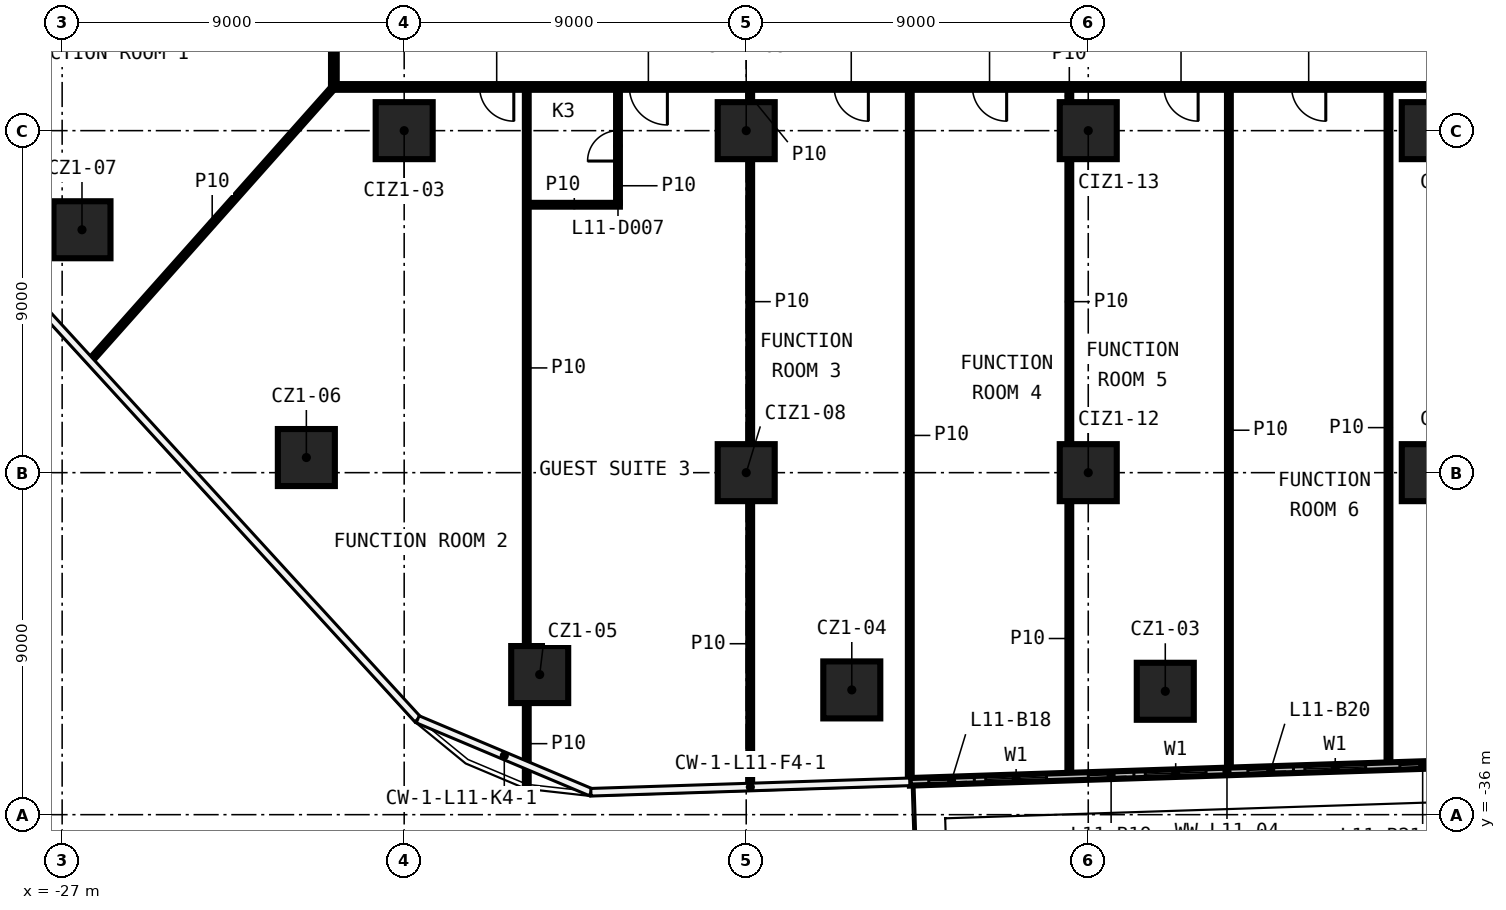
"""IFC4 building model, lengths in metres.
Left out: names, types, materials, properties, quantities, classifications, styles, units other than length and angle.
Written with IfcOpenShell. Run it as: python <this file> out.ifc"""

import sys

from ifc_helpers import new_model, si_unit, direction, frame, frame_2d, origin, origin_2d, place, context, subcontext, project, spatial, rectangle, extrude, element, fill, save


model = new_model("IFC4")
c1 = context("Model", 3, precision=1e-05, world=origin(), true_north=direction((0.0, 1.0)))
c2 = subcontext(c1, "Body", "Model", "MODEL_VIEW")
j1 = project(units=[si_unit("LENGTHUNIT", "METRE"), si_unit("PLANEANGLEUNIT", "RADIAN")], contexts=[c1])
p1 = place(None, origin())
s1 = spatial("IfcSite", under=j1, at=p1, CompositionType="ELEMENT")
p2 = place(p1, origin())
s2 = spatial("IfcBuilding", under=s1, at=p2, CompositionType="ELEMENT")
p3 = place(p2, frame((0.0, 0.0, 62.5)))
s3 = spatial("IfcBuildingStorey", under=s2, at=p3, CompositionType="ELEMENT", Elevation=62.5)
for number, where, z_axis, x_axis in (
    (1, (2.027, -32.753, 0.0), (0.0, 0.0, 1.0), (1.0, 0.0, 0.0)),
    (2, (-6.222, -32.717, 0.0), (0.0, 0.0, 1.0), (1.0, 0.0, 0.0)),
    (3, (-14.434, -32.313, 0.0), (0.0, 0.0, 1.0), (1.0, 0.0, 0.0)),
    (4, (-20.574, -26.602, 0.0), (0.0, 0.0, 1.0), (1.0, 0.0, 0.0)),
    (5, (-26.478, -20.608, 0.0), (0.0, 0.0, 1.0), (1.0, 0.0, 0.0)),
    (6, (-18.0, -18.0, 0.0), (0.0, 0.0, 1.0), (1.0, 0.0, 0.0)),
    (7, (-9.0, -27.0, 0.0), (0.0, 0.0, 1.0), (1.0, 0.0, 0.0)),
    (8, (-9.0, -18.0, 0.0), (0.0, 0.0, 1.0), (1.0, 0.0, 0.0)),
    (9, (0.0, -27.0, 0.0), (0.0, 0.0, 1.0), (1.0, 0.0, 0.0)),
    (10, (0.0, -18.0, 0.0), (0.0, 0.0, 1.0), (1.0, 0.0, 0.0)),
    (11, (9.0, -27.0, 0.0), (0.0, 0.0, 1.0), (1.0, 0.0, 0.0)),
    (12, (9.0, -18.0, 0.0), (0.0, 0.0, 1.0), (1.0, 0.0, 0.0)),
):
    element("IfcColumn", number, at=place(p3, frame(where, z_axis=z_axis, x_axis=x_axis)), inside=s3, PredefinedType="COLUMN", context=c2, shape_type="SweptSolid", body=[
        extrude(rectangle(XDim=1.5, YDim=1.5, at=origin_2d()), origin(), (0.0, 0.0, 1.0), 3.3),
    ])
p4 = place(p3, frame((-14.724, -19.95, 0.0), z_axis=(0.0, 0.0, 1.0), x_axis=(1.0, 0.0, 0.0)))
e13 = element("IfcWall", 13, at=p4, inside=s3, PredefinedType="PARTITIONING", context=c2, shape_type="SweptSolid", body=[
    extrude(rectangle(XDim=2.4, YDim=0.1, at=frame_2d((1.2, 0.0))), origin(), (0.0, 0.0, 1.0), 3.3),
])
p5 = place(p3, frame((19.925, -16.85, 0.0), z_axis=(0.0, 0.0, 1.0), x_axis=(-1.0, 0.0, 0.0)))
e14 = element("IfcWall", 14, at=p5, inside=s3, PredefinedType="PARTITIONING", context=c2, shape_type="SweptSolid", body=[
    extrude(rectangle(XDim=39.85, YDim=0.15, at=frame_2d((19.925, 0.0))), origin(), (0.0, 0.0, 1.0), 3.3),
])
p6 = place(p5, frame((35.041, 0.0, 0.0)))
e15 = element("IfcOpeningElement", 15, at=p6, cuts=e14, PredefinedType="OPENING", context=c2, shape_type="SweptSolid", body=[
    extrude(rectangle(XDim=0.9, YDim=2.1, at=frame_2d((0.45, 1.05))), frame((0.0, 0.085, 0.0), z_axis=(0.0, -1.0, 0.0), x_axis=(1.0, 0.0, 0.0)), (0.0, 0.0, 1.0), 0.17),
])
p7 = place(p5, frame((31.0, 0.0, 0.0)))
e16 = element("IfcOpeningElement", 16, at=p7, cuts=e14, PredefinedType="OPENING", context=c2, shape_type="SweptSolid", body=[
    extrude(rectangle(XDim=1.0, YDim=2.1, at=frame_2d((0.5, 1.05))), frame((0.0, 0.085, 0.0), z_axis=(0.0, -1.0, 0.0), x_axis=(1.0, 0.0, 0.0)), (0.0, 0.0, 1.0), 0.17),
])
p8 = place(p5, frame((25.711, 0.0, 0.0)))
e17 = element("IfcOpeningElement", 17, at=p8, cuts=e14, PredefinedType="OPENING", context=c2, shape_type="SweptSolid", body=[
    extrude(rectangle(XDim=0.9, YDim=2.1, at=frame_2d((0.45, 1.05))), frame((0.0, 0.085, 0.0), z_axis=(0.0, -1.0, 0.0), x_axis=(1.0, 0.0, 0.0)), (0.0, 0.0, 1.0), 0.17),
])
p9 = place(p5, frame((22.072, 0.0, 0.0)))
e18 = element("IfcOpeningElement", 18, at=p9, cuts=e14, PredefinedType="OPENING", context=c2, shape_type="SweptSolid", body=[
    extrude(rectangle(XDim=0.9, YDim=2.1, at=frame_2d((0.45, 1.05))), frame((0.0, 0.085, 0.0), z_axis=(0.0, -1.0, 0.0), x_axis=(1.0, 0.0, 0.0)), (0.0, 0.0, 1.0), 0.17),
])
p10 = place(p5, frame((17.034, 0.0, 0.0)))
e19 = element("IfcOpeningElement", 19, at=p10, cuts=e14, PredefinedType="OPENING", context=c2, shape_type="SweptSolid", body=[
    extrude(rectangle(XDim=0.9, YDim=2.1, at=frame_2d((0.45, 1.05))), frame((0.0, 0.085, 0.0), z_axis=(0.0, -1.0, 0.0), x_axis=(1.0, 0.0, 0.0)), (0.0, 0.0, 1.0), 0.17),
])
p11 = place(p5, frame((13.675, 0.0, 0.0)))
e20 = element("IfcOpeningElement", 20, at=p11, cuts=e14, PredefinedType="OPENING", context=c2, shape_type="SweptSolid", body=[
    extrude(rectangle(XDim=0.9, YDim=2.1, at=frame_2d((0.45, 1.05))), frame((0.0, 0.085, 0.0), z_axis=(0.0, -1.0, 0.0), x_axis=(1.0, 0.0, 0.0)), (0.0, 0.0, 1.0), 0.17),
])
p12 = place(p5, frame((4.031, 0.0, 0.0)))
e21 = element("IfcOpeningElement", 21, at=p12, cuts=e14, PredefinedType="OPENING", context=c2, shape_type="SweptSolid", body=[
    extrude(rectangle(XDim=1.0, YDim=2.1, at=frame_2d((0.5, 1.05))), frame((0.0, 0.085, 0.0), z_axis=(0.0, -1.0, 0.0), x_axis=(1.0, 0.0, 0.0)), (0.0, 0.0, 1.0), 0.17),
])
p13 = place(p3, frame((-26.253, -24.05, 0.0), z_axis=(0.0, 0.0, 1.0), x_axis=(0.66458555916, 0.747212175059, 0.0)))
e22 = element("IfcWall", 22, at=p13, inside=s3, PredefinedType="PARTITIONING", context=c2, shape_type="SweptSolid", body=[
    extrude(rectangle(XDim=9.635, YDim=0.1, at=frame_2d((4.818, 0.0))), origin(), (0.0, 0.0, 1.0), 3.3),
])
p14 = place(p3, frame((7.9, -34.704, 0.0), z_axis=(0.0, 0.0, 1.0), x_axis=(0.0, 1.0, 0.0)))
e23 = element("IfcWall", 23, at=p14, inside=s3, PredefinedType="PARTITIONING", context=c2, shape_type="SweptSolid", body=[
    extrude(rectangle(XDim=17.779, YDim=0.1, at=frame_2d((8.89, 0.0))), origin(), (0.0, 0.0, 1.0), 3.3),
])
p15 = place(p3, frame((3.701, -34.842, 0.0), z_axis=(0.0, 0.0, 1.0), x_axis=(0.0, 1.0, 0.0)))
e24 = element("IfcWall", 24, at=p15, inside=s3, PredefinedType="PARTITIONING", context=c2, shape_type="SweptSolid", body=[
    extrude(rectangle(XDim=17.917, YDim=0.1, at=frame_2d((8.958, 0.0))), origin(), (0.0, 0.0, 1.0), 3.3),
])
p16 = place(p3, frame((-0.498, -34.979, 0.0), z_axis=(0.0, 0.0, 1.0), x_axis=(0.0, 1.0, 0.0)))
e25 = element("IfcWall", 25, at=p16, inside=s3, PredefinedType="PARTITIONING", context=c2, shape_type="SweptSolid", body=[
    extrude(rectangle(XDim=7.229, YDim=0.1, at=frame_2d((3.614, 0.0))), origin(), (0.0, 0.0, 1.0), 3.3),
])
p17 = place(p3, frame((-0.498, -26.25, 0.0), z_axis=(0.0, 0.0, 1.0), x_axis=(0.0, 1.0, 0.0)))
e26 = element("IfcWall", 26, at=p17, inside=s3, PredefinedType="PARTITIONING", context=c2, shape_type="SweptSolid", body=[
    extrude(rectangle(XDim=7.5, YDim=0.1, at=frame_2d((3.75, 0.0))), origin(), (0.0, 0.0, 1.0), 3.3),
])
p18 = place(p3, frame((-0.498, -17.25, 0.0), z_axis=(0.0, 0.0, 1.0), x_axis=(0.0, 1.0, 0.0)))
e27 = element("IfcWall", 27, at=p18, inside=s3, PredefinedType="PARTITIONING", context=c2, shape_type="SweptSolid", body=[
    extrude(rectangle(XDim=0.325, YDim=0.1, at=frame_2d((0.163, 0.0))), origin(), (0.0, 0.0, 1.0), 3.3),
])
p19 = place(p3, frame((-4.696, -35.116, 0.0), z_axis=(0.0, 0.0, 1.0), x_axis=(0.0, 1.0, 0.0)))
e28 = element("IfcWall", 28, at=p19, inside=s3, PredefinedType="PARTITIONING", context=c2, shape_type="SweptSolid", body=[
    extrude(rectangle(XDim=18.191, YDim=0.1, at=frame_2d((9.095, 0.0))), origin(), (0.0, 0.0, 1.0), 3.3),
])
p20 = place(p3, frame((-8.895, -35.253, 0.0), z_axis=(0.0, 0.0, 1.0), x_axis=(0.0, 1.0, 0.0)))
e29 = element("IfcWall", 29, at=p20, inside=s3, PredefinedType="PARTITIONING", context=c2, shape_type="SweptSolid", body=[
    extrude(rectangle(XDim=7.503, YDim=0.1, at=frame_2d((3.751, 0.0))), origin(), (0.0, 0.0, 1.0), 3.3),
])
p21 = place(p3, frame((-8.895, -26.25, 0.0), z_axis=(0.0, 0.0, 1.0), x_axis=(0.0, 1.0, 0.0)))
e30 = element("IfcWall", 30, at=p21, inside=s3, PredefinedType="PARTITIONING", context=c2, shape_type="SweptSolid", body=[
    extrude(rectangle(XDim=7.5, YDim=0.1, at=frame_2d((3.75, 0.0))), origin(), (0.0, 0.0, 1.0), 3.3),
])
p22 = place(p3, frame((-8.895, -17.25, 0.0), z_axis=(0.0, 0.0, 1.0), x_axis=(0.0, 1.0, 0.0)))
e31 = element("IfcWall", 31, at=p22, inside=s3, PredefinedType="PARTITIONING", context=c2, shape_type="SweptSolid", body=[
    extrude(rectangle(XDim=0.325, YDim=0.1, at=frame_2d((0.163, 0.0))), origin(), (0.0, 0.0, 1.0), 3.3),
])
p23 = place(p3, frame((-12.374, -19.9, 0.0), z_axis=(0.0, 0.0, 1.0), x_axis=(0.0, 1.0, 0.0)))
e32 = element("IfcWall", 32, at=p23, inside=s3, PredefinedType="PARTITIONING", context=c2, shape_type="SweptSolid", body=[
    extrude(rectangle(XDim=2.975, YDim=0.1, at=frame_2d((1.487, 0.0))), origin(), (0.0, 0.0, 1.0), 3.3),
])
p24 = place(p23, frame((1.1, 0.0, 0.0)))
e33 = element("IfcOpeningElement", 33, at=p24, cuts=e32, PredefinedType="OPENING", context=c2, shape_type="SweptSolid", body=[
    extrude(rectangle(XDim=0.8, YDim=2.1, at=frame_2d((0.4, 1.05))), frame((0.0, 0.06, 0.0), z_axis=(0.0, -1.0, 0.0), x_axis=(1.0, 0.0, 0.0)), (0.0, 0.0, 1.0), 0.12),
])
p25 = place(p3, frame((-14.774, -35.2, 0.0), z_axis=(0.0, 0.0, 1.0), x_axis=(0.0, 1.0, 0.0)))
e34 = element("IfcWall", 34, at=p25, inside=s3, PredefinedType="PARTITIONING", context=c2, shape_type="SweptSolid", body=[
    extrude(rectangle(XDim=2.137, YDim=0.1, at=frame_2d((1.068, 0.0))), origin(), (0.0, 0.0, 1.0), 3.3),
])
p26 = place(p3, frame((-14.774, -31.563, 0.0), z_axis=(0.0, 0.0, 1.0), x_axis=(0.0, 1.0, 0.0)))
e35 = element("IfcWall", 35, at=p26, inside=s3, PredefinedType="PARTITIONING", context=c2, shape_type="SweptSolid", body=[
    extrude(rectangle(XDim=14.638, YDim=0.1, at=frame_2d((7.319, 0.0))), origin(), (0.0, 0.0, 1.0), 3.3),
])
p27 = place(p3, frame((-19.85, -16.775, 0.0), z_axis=(0.0, 0.0, 1.0), x_axis=(0.0, 1.0, 0.0)))
e36 = element("IfcWall", 36, at=p27, inside=s3, PredefinedType="PARTITIONING", context=c2, shape_type="SweptSolid", body=[
    extrude(rectangle(XDim=33.55, YDim=0.15, at=frame_2d((16.775, 0.0))), origin(), (0.0, 0.0, 1.0), 3.3),
])
p28 = place(p27, frame((12.083, 0.0, 0.0)))
e37 = element("IfcOpeningElement", 37, at=p28, cuts=e36, PredefinedType="OPENING", context=c2, shape_type="SweptSolid", body=[
    extrude(rectangle(XDim=1.0, YDim=2.1, at=frame_2d((0.5, 1.05))), frame((0.0, 0.085, 0.0), z_axis=(0.0, -1.0, 0.0), x_axis=(1.0, 0.0, 0.0)), (0.0, 0.0, 1.0), 0.17),
])
p29 = place(p27, frame((10.128, 0.0, 0.0)))
e38 = element("IfcOpeningElement", 38, at=p29, cuts=e36, PredefinedType="OPENING", context=c2, shape_type="SweptSolid", body=[
    extrude(rectangle(XDim=1.0, YDim=2.1, at=frame_2d((0.5, 1.05))), frame((0.0, 0.085, 0.0), z_axis=(0.0, -1.0, 0.0), x_axis=(1.0, 0.0, 0.0)), (0.0, 0.0, 1.0), 0.17),
])
p30 = place(p27, frame((3.259, 0.0, 0.0)))
e39 = element("IfcOpeningElement", 39, at=p30, cuts=e36, PredefinedType="OPENING", context=c2, shape_type="SweptSolid", body=[
    extrude(rectangle(XDim=0.9, YDim=2.1, at=frame_2d((0.45, 1.05))), frame((0.0, 0.085, 0.0), z_axis=(0.0, -1.0, 0.0), x_axis=(1.0, 0.0, 0.0)), (0.0, 0.0, 1.0), 0.17),
])
p31 = place(p27, frame((30.799, 0.0, 0.0)))
e40 = element("IfcOpeningElement", 40, at=p31, cuts=e36, PredefinedType="OPENING", context=c2, shape_type="SweptSolid", body=[
    extrude(rectangle(XDim=1.0, YDim=2.1, at=frame_2d((0.5, 1.05))), frame((0.0, 0.085, 0.0), z_axis=(0.0, -1.0, 0.0), x_axis=(1.0, 0.0, 0.0)), (0.0, 0.0, 1.0), 0.17),
])
p32 = place(p27, frame((22.638, 0.0, 0.0)))
e41 = element("IfcOpeningElement", 41, at=p32, cuts=e36, PredefinedType="OPENING", context=c2, shape_type="SweptSolid", body=[
    extrude(rectangle(XDim=1.0, YDim=2.1, at=frame_2d((0.5, 1.05))), frame((0.0, 0.085, 0.0), z_axis=(0.0, -1.0, 0.0), x_axis=(1.0, 0.0, 0.0)), (0.0, 0.0, 1.0), 0.17),
])
p33 = place(p27, frame((18.681, 0.0, 0.0)))
e42 = element("IfcOpeningElement", 42, at=p33, cuts=e36, PredefinedType="OPENING", context=c2, shape_type="SweptSolid", body=[
    extrude(rectangle(XDim=0.9, YDim=2.1, at=frame_2d((0.45, 1.05))), frame((0.0, 0.085, 0.0), z_axis=(0.0, -1.0, 0.0), x_axis=(1.0, 0.0, 0.0)), (0.0, 0.0, 1.0), 0.17),
])
p34 = place(p3, frame((-4.697, -35.136, 0.0), z_axis=(0.0, 0.0, 1.0), x_axis=(0.999466983916, 0.032645796998, 0.0)))
e43 = element("IfcWall", 43, at=p34, inside=s3, PredefinedType="SOLIDWALL", context=c2, shape_type="SweptSolid", body=[
    extrude(rectangle(XDim=16.804, YDim=0.2, at=frame_2d((8.402, 0.0))), origin(), (0.0, 0.0, 1.0), 3.3),
])
p35 = place(p34, frame((2.0, 0.0, 0.6)))
e44 = element("IfcOpeningElement", 44, at=p35, cuts=e43, PredefinedType="OPENING", context=c2, shape_type="SweptSolid", body=[
    extrude(rectangle(XDim=1.6, YDim=2.4, at=frame_2d((0.8, 1.2))), frame((0.0, 0.11, 0.0), z_axis=(0.0, -1.0, 0.0), x_axis=(1.0, 0.0, 0.0)), (0.0, 0.0, 1.0), 0.22),
])
p36 = place(p34, frame((0.5, 0.0, 0.0)))
e45 = element("IfcOpeningElement", 45, at=p36, cuts=e43, PredefinedType="OPENING", context=c2, shape_type="SweptSolid", body=[
    extrude(rectangle(XDim=1.2, YDim=2.4, at=frame_2d((0.6, 1.2))), frame((0.0, 0.11, 0.0), z_axis=(0.0, -1.0, 0.0), x_axis=(1.0, 0.0, 0.0)), (0.0, 0.0, 1.0), 0.22),
])
p37 = place(p34, frame((6.201, 0.0, 0.6)))
e46 = element("IfcOpeningElement", 46, at=p37, cuts=e43, PredefinedType="OPENING", context=c2, shape_type="SweptSolid", body=[
    extrude(rectangle(XDim=1.6, YDim=2.4, at=frame_2d((0.8, 1.2))), frame((0.0, 0.11, 0.0), z_axis=(0.0, -1.0, 0.0), x_axis=(1.0, 0.0, 0.0)), (0.0, 0.0, 1.0), 0.22),
])
p38 = place(p34, frame((4.701, 0.0, 0.0)))
e47 = element("IfcOpeningElement", 47, at=p38, cuts=e43, PredefinedType="OPENING", context=c2, shape_type="SweptSolid", body=[
    extrude(rectangle(XDim=1.2, YDim=2.4, at=frame_2d((0.6, 1.2))), frame((0.0, 0.11, 0.0), z_axis=(0.0, -1.0, 0.0), x_axis=(1.0, 0.0, 0.0)), (0.0, 0.0, 1.0), 0.22),
])
p39 = place(p34, frame((10.402, 0.0, 0.6)))
e48 = element("IfcOpeningElement", 48, at=p39, cuts=e43, PredefinedType="OPENING", context=c2, shape_type="SweptSolid", body=[
    extrude(rectangle(XDim=1.6, YDim=2.4, at=frame_2d((0.8, 1.2))), frame((0.0, 0.11, 0.0), z_axis=(0.0, -1.0, 0.0), x_axis=(1.0, 0.0, 0.0)), (0.0, 0.0, 1.0), 0.22),
])
p40 = place(p34, frame((8.902, 0.0, 0.0)))
e49 = element("IfcOpeningElement", 49, at=p40, cuts=e43, PredefinedType="OPENING", context=c2, shape_type="SweptSolid", body=[
    extrude(rectangle(XDim=1.2, YDim=2.4, at=frame_2d((0.6, 1.2))), frame((0.0, 0.11, 0.0), z_axis=(0.0, -1.0, 0.0), x_axis=(1.0, 0.0, 0.0)), (0.0, 0.0, 1.0), 0.22),
])
p41 = place(p34, frame((14.603, 0.0, 0.6)))
e50 = element("IfcOpeningElement", 50, at=p41, cuts=e43, PredefinedType="OPENING", context=c2, shape_type="SweptSolid", body=[
    extrude(rectangle(XDim=1.6, YDim=2.4, at=frame_2d((0.8, 1.2))), frame((0.0, 0.11, 0.0), z_axis=(0.0, -1.0, 0.0), x_axis=(1.0, 0.0, 0.0)), (0.0, 0.0, 1.0), 0.22),
])
p42 = place(p34, frame((12.903, 0.0, 0.0)))
e51 = element("IfcOpeningElement", 51, at=p42, cuts=e43, PredefinedType="OPENING", context=c2, shape_type="SweptSolid", body=[
    extrude(rectangle(XDim=1.2, YDim=2.4, at=frame_2d((0.6, 1.2))), frame((0.0, 0.11, 0.0), z_axis=(0.0, -1.0, 0.0), x_axis=(1.0, 0.0, 0.0)), (0.0, 0.0, 1.0), 0.22),
])
p43 = place(p6, origin())
e52 = element("IfcDoor", 52, at=p43, inside=s3, OperationType="SINGLE_SWING_LEFT", PredefinedType="DOOR", context=c2, shape_type="SweptSolid", body=[
    extrude(rectangle(XDim=0.9, YDim=2.1, at=frame_2d((0.45, 1.05))), frame((0.0, 0.025, 0.0), z_axis=(0.0, -1.0, 0.0), x_axis=(1.0, 0.0, 0.0)), (0.0, 0.0, 1.0), 0.05),
])
fill(e15, e52)
p44 = place(p24, origin())
e53 = element("IfcDoor", 53, at=p44, inside=s3, OperationType="SINGLE_SWING_LEFT", PredefinedType="DOOR", context=c2, shape_type="SweptSolid", body=[
    extrude(rectangle(XDim=0.8, YDim=2.1, at=frame_2d((0.4, 1.05))), frame((0.0, 0.025, 0.0), z_axis=(0.0, -1.0, 0.0), x_axis=(1.0, 0.0, 0.0)), (0.0, 0.0, 1.0), 0.05),
])
fill(e33, e53)
p45 = place(p7, origin())
e54 = element("IfcDoor", 54, at=p45, inside=s3, OperationType="SINGLE_SWING_RIGHT", PredefinedType="DOOR", context=c2, shape_type="SweptSolid", body=[
    extrude(rectangle(XDim=1.0, YDim=2.1, at=frame_2d((0.5, 1.05))), frame((0.0, 0.025, 0.0), z_axis=(0.0, -1.0, 0.0), x_axis=(1.0, 0.0, 0.0)), (0.0, 0.0, 1.0), 0.05),
])
fill(e16, e54)
p46 = place(p8, origin())
e55 = element("IfcDoor", 55, at=p46, inside=s3, OperationType="SINGLE_SWING_LEFT", PredefinedType="DOOR", context=c2, shape_type="SweptSolid", body=[
    extrude(rectangle(XDim=0.9, YDim=2.1, at=frame_2d((0.45, 1.05))), frame((0.0, 0.025, 0.0), z_axis=(0.0, -1.0, 0.0), x_axis=(1.0, 0.0, 0.0)), (0.0, 0.0, 1.0), 0.05),
])
fill(e17, e55)
p47 = place(p9, origin())
e56 = element("IfcDoor", 56, at=p47, inside=s3, OperationType="SINGLE_SWING_RIGHT", PredefinedType="DOOR", context=c2, shape_type="SweptSolid", body=[
    extrude(rectangle(XDim=0.9, YDim=2.1, at=frame_2d((0.45, 1.05))), frame((0.0, 0.025, 0.0), z_axis=(0.0, -1.0, 0.0), x_axis=(1.0, 0.0, 0.0)), (0.0, 0.0, 1.0), 0.05),
])
fill(e18, e56)
p48 = place(p10, origin())
e57 = element("IfcDoor", 57, at=p48, inside=s3, OperationType="SINGLE_SWING_LEFT", PredefinedType="DOOR", context=c2, shape_type="SweptSolid", body=[
    extrude(rectangle(XDim=0.9, YDim=2.1, at=frame_2d((0.45, 1.05))), frame((0.0, 0.025, 0.0), z_axis=(0.0, -1.0, 0.0), x_axis=(1.0, 0.0, 0.0)), (0.0, 0.0, 1.0), 0.05),
])
fill(e19, e57)
p49 = place(p11, origin())
e58 = element("IfcDoor", 58, at=p49, inside=s3, OperationType="SINGLE_SWING_RIGHT", PredefinedType="DOOR", context=c2, shape_type="SweptSolid", body=[
    extrude(rectangle(XDim=0.9, YDim=2.1, at=frame_2d((0.45, 1.05))), frame((0.0, 0.025, 0.0), z_axis=(0.0, -1.0, 0.0), x_axis=(1.0, 0.0, 0.0)), (0.0, 0.0, 1.0), 0.05),
])
fill(e20, e58)
p50 = place(p35, origin())
e59 = element("IfcWindow", 59, at=p50, inside=s3, PartitioningType="SINGLE_PANEL", PredefinedType="WINDOW", context=c2, shape_type="SweptSolid", body=[
    extrude(rectangle(XDim=1.6, YDim=2.4, at=frame_2d((0.8, 1.2))), frame((0.0, 0.03, 0.0), z_axis=(0.0, -1.0, 0.0), x_axis=(1.0, 0.0, 0.0)), (0.0, 0.0, 1.0), 0.06),
])
fill(e44, e59)
p51 = place(p36, origin())
e60 = element("IfcDoor", 60, at=p51, inside=s3, OperationType="SLIDING_TO_LEFT", PredefinedType="DOOR", context=c2, shape_type="SweptSolid", body=[
    extrude(rectangle(XDim=1.2, YDim=2.4, at=frame_2d((0.6, 1.2))), frame((0.0, 0.025, 0.0), z_axis=(0.0, -1.0, 0.0), x_axis=(1.0, 0.0, 0.0)), (0.0, 0.0, 1.0), 0.05),
])
fill(e45, e60)
p52 = place(p37, origin())
e61 = element("IfcWindow", 61, at=p52, inside=s3, PartitioningType="SINGLE_PANEL", PredefinedType="WINDOW", context=c2, shape_type="SweptSolid", body=[
    extrude(rectangle(XDim=1.6, YDim=2.4, at=frame_2d((0.8, 1.2))), frame((0.0, 0.03, 0.0), z_axis=(0.0, -1.0, 0.0), x_axis=(1.0, 0.0, 0.0)), (0.0, 0.0, 1.0), 0.06),
])
fill(e46, e61)
p53 = place(p38, origin())
e62 = element("IfcDoor", 62, at=p53, inside=s3, OperationType="SLIDING_TO_LEFT", PredefinedType="DOOR", context=c2, shape_type="SweptSolid", body=[
    extrude(rectangle(XDim=1.2, YDim=2.4, at=frame_2d((0.6, 1.2))), frame((0.0, 0.025, 0.0), z_axis=(0.0, -1.0, 0.0), x_axis=(1.0, 0.0, 0.0)), (0.0, 0.0, 1.0), 0.05),
])
fill(e47, e62)
p54 = place(p39, origin())
e63 = element("IfcWindow", 63, at=p54, inside=s3, PartitioningType="SINGLE_PANEL", PredefinedType="WINDOW", context=c2, shape_type="SweptSolid", body=[
    extrude(rectangle(XDim=1.6, YDim=2.4, at=frame_2d((0.8, 1.2))), frame((0.0, 0.03, 0.0), z_axis=(0.0, -1.0, 0.0), x_axis=(1.0, 0.0, 0.0)), (0.0, 0.0, 1.0), 0.06),
])
fill(e48, e63)
p55 = place(p40, origin())
e64 = element("IfcDoor", 64, at=p55, inside=s3, OperationType="SLIDING_TO_LEFT", PredefinedType="DOOR", context=c2, shape_type="SweptSolid", body=[
    extrude(rectangle(XDim=1.2, YDim=2.4, at=frame_2d((0.6, 1.2))), frame((0.0, 0.025, 0.0), z_axis=(0.0, -1.0, 0.0), x_axis=(1.0, 0.0, 0.0)), (0.0, 0.0, 1.0), 0.05),
])
fill(e49, e64)
p56 = place(p42, origin())
e65 = element("IfcDoor", 65, at=p56, inside=s3, OperationType="SLIDING_TO_LEFT", PredefinedType="DOOR", context=c2, shape_type="SweptSolid", body=[
    extrude(rectangle(XDim=1.2, YDim=2.4, at=frame_2d((0.6, 1.2))), frame((0.0, 0.025, 0.0), z_axis=(0.0, -1.0, 0.0), x_axis=(1.0, 0.0, 0.0)), (0.0, 0.0, 1.0), 0.05),
])
fill(e51, e65)
save(model, sys.argv[1])
